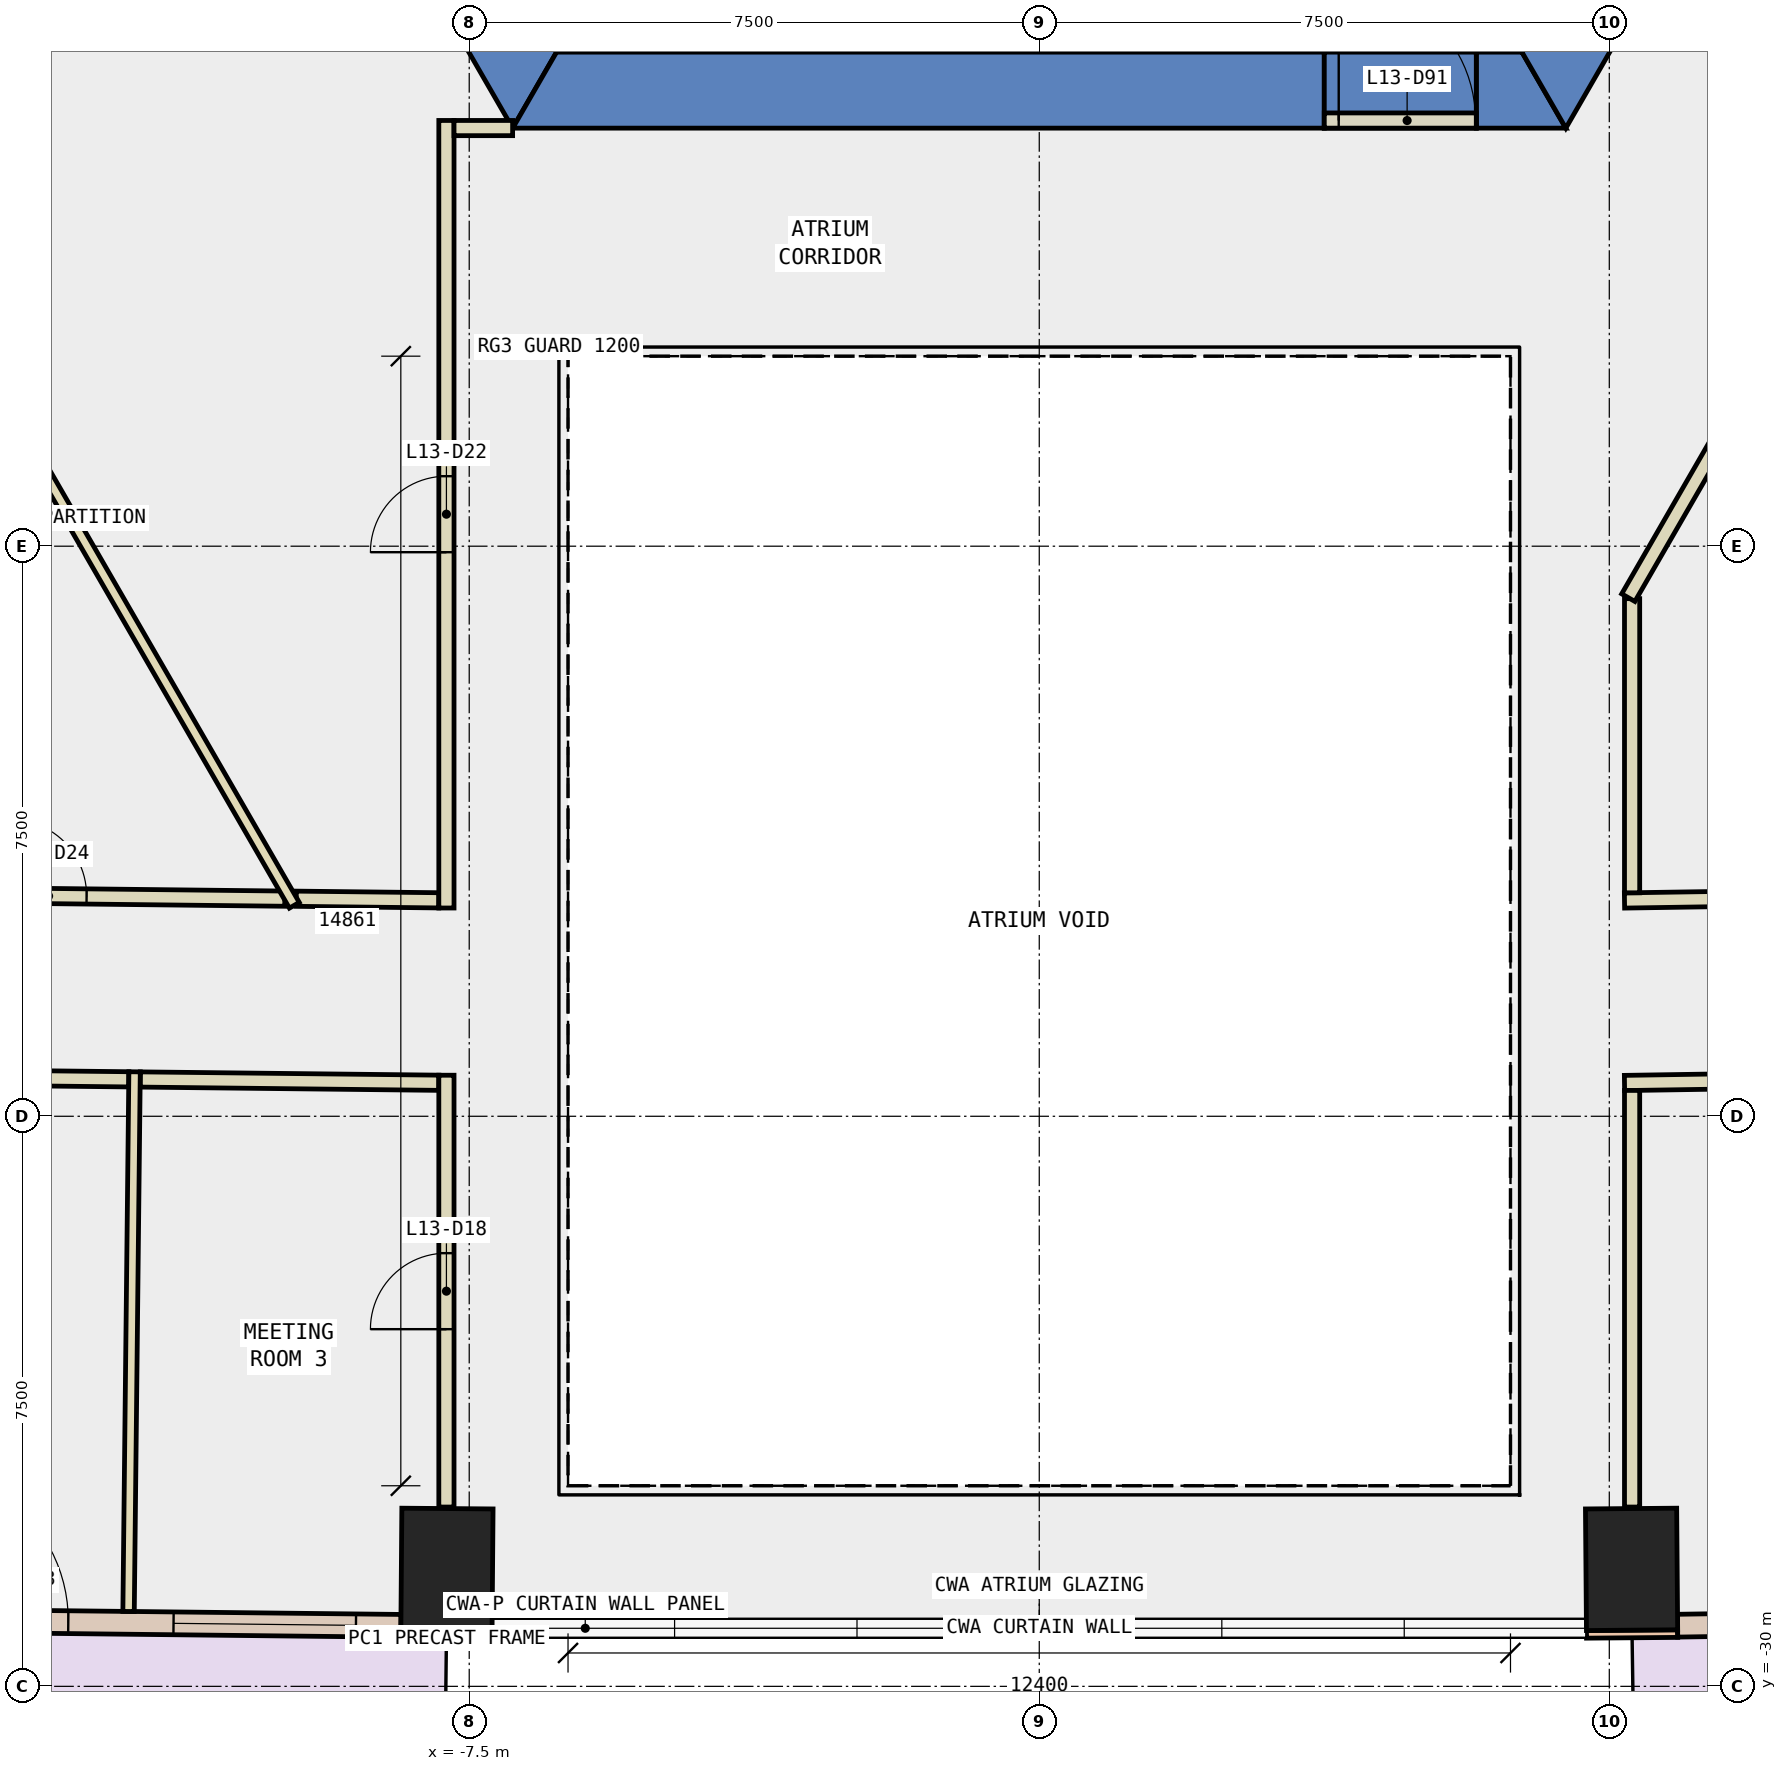
"""IFC4 building model, lengths in metres.
Left out: names, types, materials, properties, quantities, classifications, styles, units other than length and angle.
Written with IfcOpenShell. Run it as: python <this file> out.ifc"""

import sys

from ifc_helpers import new_model, si_unit, direction, frame, frame_2d, origin, origin_2d, place, context, subcontext, project, spatial, polyline, rectangle, outline, extrude, element, fill, save


model = new_model("IFC4")
c1 = context("Model", 3, precision=1e-05, world=origin(), true_north=direction((0.0, 1.0)))
c2 = subcontext(c1, "Body", "Model", "MODEL_VIEW")
j1 = project(units=[si_unit("LENGTHUNIT", "METRE"), si_unit("PLANEANGLEUNIT", "RADIAN")], contexts=[c1])
p1 = place(None, origin())
s1 = spatial("IfcSite", under=j1, at=p1, CompositionType="ELEMENT")
p2 = place(p1, origin())
s2 = spatial("IfcBuilding", under=s1, at=p2, CompositionType="ELEMENT")
p3 = place(p2, frame((0.0, 0.0, 64.4)))
s3 = spatial("IfcBuildingStorey", under=s2, at=p3, CompositionType="ELEMENT", Elevation=64.4)
for number, where, z_axis, x_axis in (
    (1, (-7.793, -28.461, -0.4), (0.0, 0.0, 1.0), (-1.0, 0.008, 0.0)),
    (2, (7.793, -28.461, -0.4), (0.0, 0.0, 1.0), (1.0, 0.008, 0.0)),
):
    element("IfcColumn", number, at=place(p3, frame(where, z_axis=z_axis, x_axis=x_axis)), inside=s3, PredefinedType="COLUMN", context=c2, shape_type="SweptSolid", body=[
        extrude(rectangle(XDim=1.2, YDim=1.6, at=origin_2d()), origin(), (0.0, 0.0, 1.0), 4.2),
    ])
p4 = place(p3, frame((0.0, 0.0, -0.4)))
e3 = element("IfcWall", 3, at=p4, inside=s3, PredefinedType="SHEAR", context=c2, shape_type="SweptSolid", body=[
    extrude(outline(polyline([(-13.856, 2.5), (-6.928, -9.5), (-6.351, -8.5), (-12.702, 2.5), (-13.856, 2.5)])), origin(), (0.0, 0.0, 1.0), 4.2),
])
p5 = place(p3, frame((0.0, 0.0, -0.4)))
e4 = element("IfcWall", 4, at=p5, inside=s3, PredefinedType="SHEAR", context=c2, shape_type="SweptSolid", body=[
    extrude(outline(polyline([(3.75, -9.5), (3.75, -8.5), (-6.351, -8.5), (-6.928, -9.5), (3.75, -9.5)])), origin(), (0.0, 0.0, 1.0), 4.2),
])
p6 = place(p3, frame((0.0, 0.0, -0.4)))
e5 = element("IfcWall", 5, at=p6, inside=s3, PredefinedType="SHEAR", context=c2, shape_type="SweptSolid", body=[
    extrude(outline(polyline([(5.75, -8.5), (5.75, -9.5), (6.928, -9.5), (6.351, -8.5), (5.75, -8.5)])), origin(), (0.0, 0.0, 1.0), 4.2),
])
p7 = place(p3, frame((0.0, 0.0, 3.6)))
e6 = element("IfcWall", 6, at=p7, inside=s3, PredefinedType="SHEAR", context=c2, shape_type="SweptSolid", body=[
    extrude(outline(polyline([(5.75, -9.5), (5.75, -8.5), (3.75, -8.5), (3.75, -9.5), (5.75, -9.5)])), origin(), (0.0, 0.0, 1.0), 0.2),
])
p8 = place(p3, frame((0.0, 0.0, -0.4)))
e7 = element("IfcWall", 7, at=p8, inside=s3, PredefinedType="SHEAR", context=c2, shape_type="SweptSolid", body=[
    extrude(outline(polyline([(8.117, -7.44), (7.252, -6.94), (6.351, -8.5), (6.928, -9.5), (8.117, -7.44)])), origin(), (0.0, 0.0, 1.0), 4.2),
])
p9 = place(p3, frame((-9.31, -5.375, -0.4), z_axis=(0.0, 0.0, 1.0), x_axis=(-0.866017533419, -0.500013631625, 0.0)))
e8 = element("IfcWall", 8, at=p9, inside=s3, PredefinedType="SHEAR", context=c2, shape_type="SweptSolid", body=[
    extrude(rectangle(XDim=9.0, YDim=0.8, at=frame_2d((4.5, 0.0))), origin(), (0.0, 0.0, 1.0), 4.2),
])
for number, where, z_axis, x_axis in (
    (9, (-8.4, -29.306, 0.0), (0.0, 0.0, 1.0), (1.0, -0.008, 0.0)),
    (10, (7.2, -29.316, 0.0), (0.0, 0.0, 1.0), (1.0, 0.008, 0.0)),
):
    element("IfcWall", number, at=place(p3, frame(where, z_axis=z_axis, x_axis=x_axis)), inside=s3, PredefinedType="STANDARD", context=c2, shape_type="SweptSolid", body=[
        extrude(rectangle(XDim=1.2, YDim=0.1, at=frame_2d((0.6, 0.0))), origin(), (0.0, 0.0, 1.0), 3.8),
    ])
p10 = place(p3, frame((-15.568, -29.125, 0.0), z_axis=(0.0, 0.0, 1.0), x_axis=(0.999939152594, -0.011031369316, 0.0)))
e11 = element("IfcWall", 11, at=p10, inside=s3, PredefinedType="STANDARD", context=c2, shape_type="SweptSolid", body=[
    extrude(rectangle(XDim=7.171, YDim=0.3, at=frame_2d((3.585, 0.0))), origin(), (0.0, 0.0, 1.0), 3.8),
])
p11 = place(p10, frame((0.793, 0.0, 0.0)))
e12 = element("IfcOpeningElement", 12, at=p11, cuts=e11, PredefinedType="OPENING", context=c2, shape_type="SweptSolid", body=[
    extrude(rectangle(XDim=2.0, YDim=2.4, at=frame_2d((1.0, 1.2))), frame((0.0, 0.16, 0.0), z_axis=(0.0, -1.0, 0.0), x_axis=(1.0, 0.0, 0.0)), (0.0, 0.0, 1.0), 0.32),
])
p12 = place(p10, frame((4.178, 0.0, 0.9)))
e13 = element("IfcOpeningElement", 13, at=p12, cuts=e11, PredefinedType="OPENING", context=c2, shape_type="SweptSolid", body=[
    extrude(rectangle(XDim=2.4, YDim=2.6, at=frame_2d((1.2, 1.3))), frame((0.0, 0.16, 0.0), z_axis=(0.0, -1.0, 0.0), x_axis=(1.0, 0.0, 0.0)), (0.0, 0.0, 1.0), 0.32),
])
p13 = place(p3, frame((8.398, -29.202, 0.0), z_axis=(0.0, 0.0, 1.0), x_axis=(0.99988053916, 0.015456629942, 0.0)))
e14 = element("IfcWall", 14, at=p13, inside=s3, PredefinedType="STANDARD", context=c2, shape_type="SweptSolid", body=[
    extrude(rectangle(XDim=7.171, YDim=0.3, at=frame_2d((3.585, 0.0))), origin(), (0.0, 0.0, 1.0), 3.8),
])
p14 = place(p13, frame((0.793, 0.0, 0.0)))
e15 = element("IfcOpeningElement", 15, at=p14, cuts=e14, PredefinedType="OPENING", context=c2, shape_type="SweptSolid", body=[
    extrude(rectangle(XDim=2.0, YDim=2.4, at=frame_2d((1.0, 1.2))), frame((0.0, 0.16, 0.0), z_axis=(0.0, -1.0, 0.0), x_axis=(1.0, 0.0, 0.0)), (0.0, 0.0, 1.0), 0.32),
])
p15 = place(p13, frame((4.178, 0.0, 0.9)))
e16 = element("IfcOpeningElement", 16, at=p15, cuts=e14, PredefinedType="OPENING", context=c2, shape_type="SweptSolid", body=[
    extrude(rectangle(XDim=2.4, YDim=2.6, at=frame_2d((1.2, 1.3))), frame((0.0, 0.16, 0.0), z_axis=(0.0, -1.0, 0.0), x_axis=(1.0, 0.0, 0.0)), (0.0, 0.0, 1.0), 0.32),
])
p16 = place(p3, frame((7.7, -19.661, 0.0), z_axis=(0.0, 0.0, 1.0), x_axis=(0.999882138464, 0.015352823245, 0.0)))
e17 = element("IfcWall", 17, at=p16, inside=s3, PredefinedType="PARTITIONING", context=c2, shape_type="SweptSolid", body=[
    extrude(rectangle(XDim=8.269, YDim=0.2, at=frame_2d((4.135, 0.0))), origin(), (0.0, 0.0, 1.0), 3.8),
])
p17 = place(p16, frame((3.235, 0.0, 0.0)))
e18 = element("IfcOpeningElement", 18, at=p17, cuts=e17, PredefinedType="OPENING", context=c2, shape_type="SweptSolid", body=[
    extrude(rectangle(XDim=1.8, YDim=2.1, at=frame_2d((0.9, 1.05))), frame((0.0, 0.11, 0.0), z_axis=(0.0, -1.0, 0.0), x_axis=(1.0, 0.0, 0.0)), (0.0, 0.0, 1.0), 0.22),
])
p18 = place(p3, frame((-9.776, -19.638, 0.0), z_axis=(0.0, 0.0, 1.0), x_axis=(0.999937374473, -0.011191386544, 0.0)))
e19 = element("IfcWall", 19, at=p18, inside=s3, PredefinedType="PARTITIONING", context=c2, shape_type="SweptSolid", body=[
    extrude(rectangle(XDim=1.876, YDim=0.2, at=frame_2d((0.938, 0.0))), origin(), (0.0, 0.0, 1.0), 3.8),
])
p19 = place(p3, frame((-16.143, -19.568, 0.0), z_axis=(0.0, 0.0, 1.0), x_axis=(0.999938688645, -0.011073344206, 0.0)))
e20 = element("IfcWall", 20, at=p19, inside=s3, PredefinedType="PARTITIONING", context=c2, shape_type="SweptSolid", body=[
    extrude(rectangle(XDim=6.218, YDim=0.2, at=frame_2d((3.109, 0.0))), origin(), (0.0, 0.0, 1.0), 3.8),
])
p20 = place(p19, frame((2.609, 0.0, 0.0)))
e21 = element("IfcOpeningElement", 21, at=p20, cuts=e20, PredefinedType="OPENING", context=c2, shape_type="SweptSolid", body=[
    extrude(rectangle(XDim=1.0, YDim=2.1, at=frame_2d((0.5, 1.05))), frame((0.0, 0.11, 0.0), z_axis=(0.0, -1.0, 0.0), x_axis=(1.0, 0.0, 0.0)), (0.0, 0.0, 1.0), 0.22),
])
p21 = place(p3, frame((16.018, -21.933, 0.0), z_axis=(0.0, 0.0, 1.0), x_axis=(-0.999879942341, -0.015495189738, 0.0)))
e22 = element("IfcWall", 22, at=p21, inside=s3, PredefinedType="PARTITIONING", context=c2, shape_type="SweptSolid", body=[
    extrude(rectangle(XDim=8.319, YDim=0.2, at=frame_2d((4.16, 0.0))), origin(), (0.0, 0.0, 1.0), 3.8),
])
p22 = place(p21, frame((3.66, 0.0, 0.0)))
e23 = element("IfcOpeningElement", 23, at=p22, cuts=e22, PredefinedType="OPENING", context=c2, shape_type="SweptSolid", body=[
    extrude(rectangle(XDim=1.0, YDim=2.1, at=frame_2d((0.5, 1.05))), frame((0.0, 0.11, 0.0), z_axis=(0.0, -1.0, 0.0), x_axis=(1.0, 0.0, 0.0)), (0.0, 0.0, 1.0), 0.22),
])
p23 = place(p3, frame((-11.979, -22.014, 0.0), z_axis=(0.0, 0.0, 1.0), x_axis=(-0.999939456554, 0.01100378236, 0.0)))
e24 = element("IfcWall", 24, at=p23, inside=s3, PredefinedType="PARTITIONING", context=c2, shape_type="SweptSolid", body=[
    extrude(rectangle(XDim=4.171, YDim=0.2, at=frame_2d((2.085, 0.0))), origin(), (0.0, 0.0, 1.0), 3.8),
])
p24 = place(p3, frame((-7.9, -22.059, 0.0), z_axis=(0.0, 0.0, 1.0), x_axis=(-0.999940210022, 0.010935098606, 0.0)))
e25 = element("IfcWall", 25, at=p24, inside=s3, PredefinedType="PARTITIONING", context=c2, shape_type="SweptSolid", body=[
    extrude(rectangle(XDim=3.929, YDim=0.2, at=frame_2d((1.965, 0.0))), origin(), (0.0, 0.0, 1.0), 3.8),
])
p25 = place(p3, frame((7.8, -15.69, 0.0), z_axis=(0.0, 0.0, 1.0), x_axis=(0.0, -1.0, 0.0)))
e26 = element("IfcWall", 26, at=p25, inside=s3, PredefinedType="PARTITIONING", context=c2, shape_type="SweptSolid", body=[
    extrude(rectangle(XDim=3.87, YDim=0.2, at=frame_2d((1.935, 0.0))), origin(), (0.0, 0.0, 1.0), 3.8),
])
p26 = place(p3, frame((-7.8, -19.76, 0.0), z_axis=(0.0, 0.0, 1.0), x_axis=(0.0, 1.0, 0.0)))
e27 = element("IfcWall", 27, at=p26, inside=s3, PredefinedType="PARTITIONING", context=c2, shape_type="SweptSolid", body=[
    extrude(rectangle(XDim=10.361, YDim=0.2, at=frame_2d((5.181, 0.0))), origin(), (0.0, 0.0, 1.0), 3.8),
])
p27 = place(p26, frame((4.681, 0.0, 0.0)))
e28 = element("IfcOpeningElement", 28, at=p27, cuts=e27, PredefinedType="OPENING", context=c2, shape_type="SweptSolid", body=[
    extrude(rectangle(XDim=1.0, YDim=2.1, at=frame_2d((0.5, 1.05))), frame((0.0, 0.11, 0.0), z_axis=(0.0, -1.0, 0.0), x_axis=(1.0, 0.0, 0.0)), (0.0, 0.0, 1.0), 0.22),
])
p28 = place(p3, frame((-7.7, -9.499, 0.0), z_axis=(0.0, 0.0, 1.0), x_axis=(1.0, 0.0, 0.0)))
e29 = element("IfcWall", 29, at=p28, inside=s3, PredefinedType="PARTITIONING", context=c2, shape_type="SweptSolid", body=[
    extrude(rectangle(XDim=0.771, YDim=0.2, at=frame_2d((0.385, 0.0))), origin(), (0.0, 0.0, 1.0), 3.8),
])
p29 = place(p3, frame((7.8, -22.16, 0.0), z_axis=(0.0, 0.0, 1.0), x_axis=(0.0, -1.0, 0.0)))
e30 = element("IfcWall", 30, at=p29, inside=s3, PredefinedType="PARTITIONING", context=c2, shape_type="SweptSolid", body=[
    extrude(rectangle(XDim=5.481, YDim=0.2, at=frame_2d((2.741, 0.0))), origin(), (0.0, 0.0, 1.0), 3.8),
])
p30 = place(p3, frame((-7.8, -27.641, 0.0), z_axis=(0.0, 0.0, 1.0), x_axis=(0.0, 1.0, 0.0)))
e31 = element("IfcWall", 31, at=p30, inside=s3, PredefinedType="PARTITIONING", context=c2, shape_type="SweptSolid", body=[
    extrude(rectangle(XDim=5.681, YDim=0.2, at=frame_2d((2.841, 0.0))), origin(), (0.0, 0.0, 1.0), 3.8),
])
p31 = place(p30, frame((2.34, 0.0, 0.0)))
e32 = element("IfcOpeningElement", 32, at=p31, cuts=e31, PredefinedType="OPENING", context=c2, shape_type="SweptSolid", body=[
    extrude(rectangle(XDim=1.0, YDim=2.1, at=frame_2d((0.5, 1.05))), frame((0.0, 0.11, 0.0), z_axis=(0.0, -1.0, 0.0), x_axis=(1.0, 0.0, 0.0)), (0.0, 0.0, 1.0), 0.22),
])
p32 = place(p3, frame((-9.801, -19.724, 0.0), z_axis=(0.0, 0.0, 1.0), x_axis=(-0.500005867738, 0.866022016018, 0.0)))
e33 = element("IfcWall", 33, at=p32, inside=s3, PredefinedType="PARTITIONING", context=c2, shape_type="SweptSolid", body=[
    extrude(rectangle(XDim=11.781, YDim=0.15, at=frame_2d((5.891, 0.0))), origin(), (0.0, 0.0, 1.0), 3.8),
])
p33 = place(p3, frame((-11.903, -21.915, 0.0), z_axis=(0.0, 0.0, 1.0), x_axis=(-0.011106223261, -0.999938324, 0.0)))
e34 = element("IfcWall", 34, at=p33, inside=s3, PredefinedType="PARTITIONING", context=c2, shape_type="SweptSolid", body=[
    extrude(rectangle(XDim=7.1, YDim=0.15, at=frame_2d((3.55, 0.0))), origin(), (0.0, 0.0, 1.0), 3.8),
])
p34 = place(p3, frame((3.75, -9.4, 0.0), z_axis=(0.0, 0.0, 1.0), x_axis=(1.0, 0.0, 0.0)))
e35 = element("IfcWall", 35, at=p34, inside=s3, PredefinedType="PARTITIONING", context=c2, shape_type="SweptSolid", body=[
    extrude(rectangle(XDim=2.0, YDim=0.2, at=frame_2d((1.0, 0.0))), origin(), (0.0, 0.0, 1.0), 2.4),
])
p35 = place(p34, frame((0.19, 0.0, 0.0)))
e36 = element("IfcOpeningElement", 36, at=p35, cuts=e35, PredefinedType="OPENING", context=c2, shape_type="SweptSolid", body=[
    extrude(rectangle(XDim=1.8, YDim=2.1, at=frame_2d((0.9, 1.05))), frame((0.0, 0.11, 0.0), z_axis=(0.0, -1.0, 0.0), x_axis=(1.0, 0.0, 0.0)), (0.0, 0.0, 1.0), 0.22),
])
p36 = place(p3, frame((12.401, -7.622, 0.0), z_axis=(0.0, 0.0, 1.0), x_axis=(-0.500029185841, -0.866008552675, 0.0)))
e37 = element("IfcWall", 37, at=p36, inside=s3, PredefinedType="PARTITIONING", context=c2, shape_type="SweptSolid", body=[
    extrude(rectangle(XDim=9.301, YDim=0.2, at=frame_2d((4.651, 0.0))), origin(), (0.0, 0.0, 1.0), 3.8),
])
p37 = place(p11, origin())
e38 = element("IfcDoor", 38, at=p37, inside=s3, OperationType="SLIDING_TO_LEFT", PredefinedType="DOOR", context=c2, shape_type="SweptSolid", body=[
    extrude(rectangle(XDim=2.0, YDim=2.4, at=frame_2d((1.0, 1.2))), frame((0.0, 0.025, 0.0), z_axis=(0.0, -1.0, 0.0), x_axis=(1.0, 0.0, 0.0)), (0.0, 0.0, 1.0), 0.05),
])
fill(e12, e38)
p38 = place(p12, origin())
e39 = element("IfcWindow", 39, at=p38, inside=s3, PartitioningType="SINGLE_PANEL", PredefinedType="WINDOW", context=c2, shape_type="SweptSolid", body=[
    extrude(rectangle(XDim=2.4, YDim=2.6, at=frame_2d((1.2, 1.3))), frame((0.0, 0.03, 0.0), z_axis=(0.0, -1.0, 0.0), x_axis=(1.0, 0.0, 0.0)), (0.0, 0.0, 1.0), 0.06),
])
fill(e13, e39)
p39 = place(p31, origin())
e40 = element("IfcDoor", 40, at=p39, inside=s3, OperationType="SINGLE_SWING_LEFT", PredefinedType="DOOR", context=c2, shape_type="SweptSolid", body=[
    extrude(rectangle(XDim=1.0, YDim=2.1, at=frame_2d((0.5, 1.05))), frame((0.0, 0.025, 0.0), z_axis=(0.0, -1.0, 0.0), x_axis=(1.0, 0.0, 0.0)), (0.0, 0.0, 1.0), 0.05),
])
fill(e32, e40)
p40 = place(p27, origin())
e41 = element("IfcDoor", 41, at=p40, inside=s3, OperationType="SINGLE_SWING_LEFT", PredefinedType="DOOR", context=c2, shape_type="SweptSolid", body=[
    extrude(rectangle(XDim=1.0, YDim=2.1, at=frame_2d((0.5, 1.05))), frame((0.0, 0.025, 0.0), z_axis=(0.0, -1.0, 0.0), x_axis=(1.0, 0.0, 0.0)), (0.0, 0.0, 1.0), 0.05),
])
fill(e28, e41)
p41 = place(p20, origin())
e42 = element("IfcDoor", 42, at=p41, inside=s3, OperationType="SINGLE_SWING_LEFT", PredefinedType="DOOR", context=c2, shape_type="SweptSolid", body=[
    extrude(rectangle(XDim=1.0, YDim=2.1, at=frame_2d((0.5, 1.05))), frame((0.0, 0.025, 0.0), z_axis=(0.0, -1.0, 0.0), x_axis=(1.0, 0.0, 0.0)), (0.0, 0.0, 1.0), 0.05),
])
fill(e21, e42)
p42 = place(p35, origin())
e43 = element("IfcDoor", 43, at=p42, inside=s3, OperationType="DOUBLE_DOOR_SINGLE_SWING", PredefinedType="DOOR", context=c2, shape_type="SweptSolid", body=[
    extrude(rectangle(XDim=1.8, YDim=2.1, at=frame_2d((0.9, 1.05))), frame((0.0, 0.025, 0.0), z_axis=(0.0, -1.0, 0.0), x_axis=(1.0, 0.0, 0.0)), (0.0, 0.0, 1.0), 0.05),
])
fill(e36, e43)
save(model, sys.argv[1])
